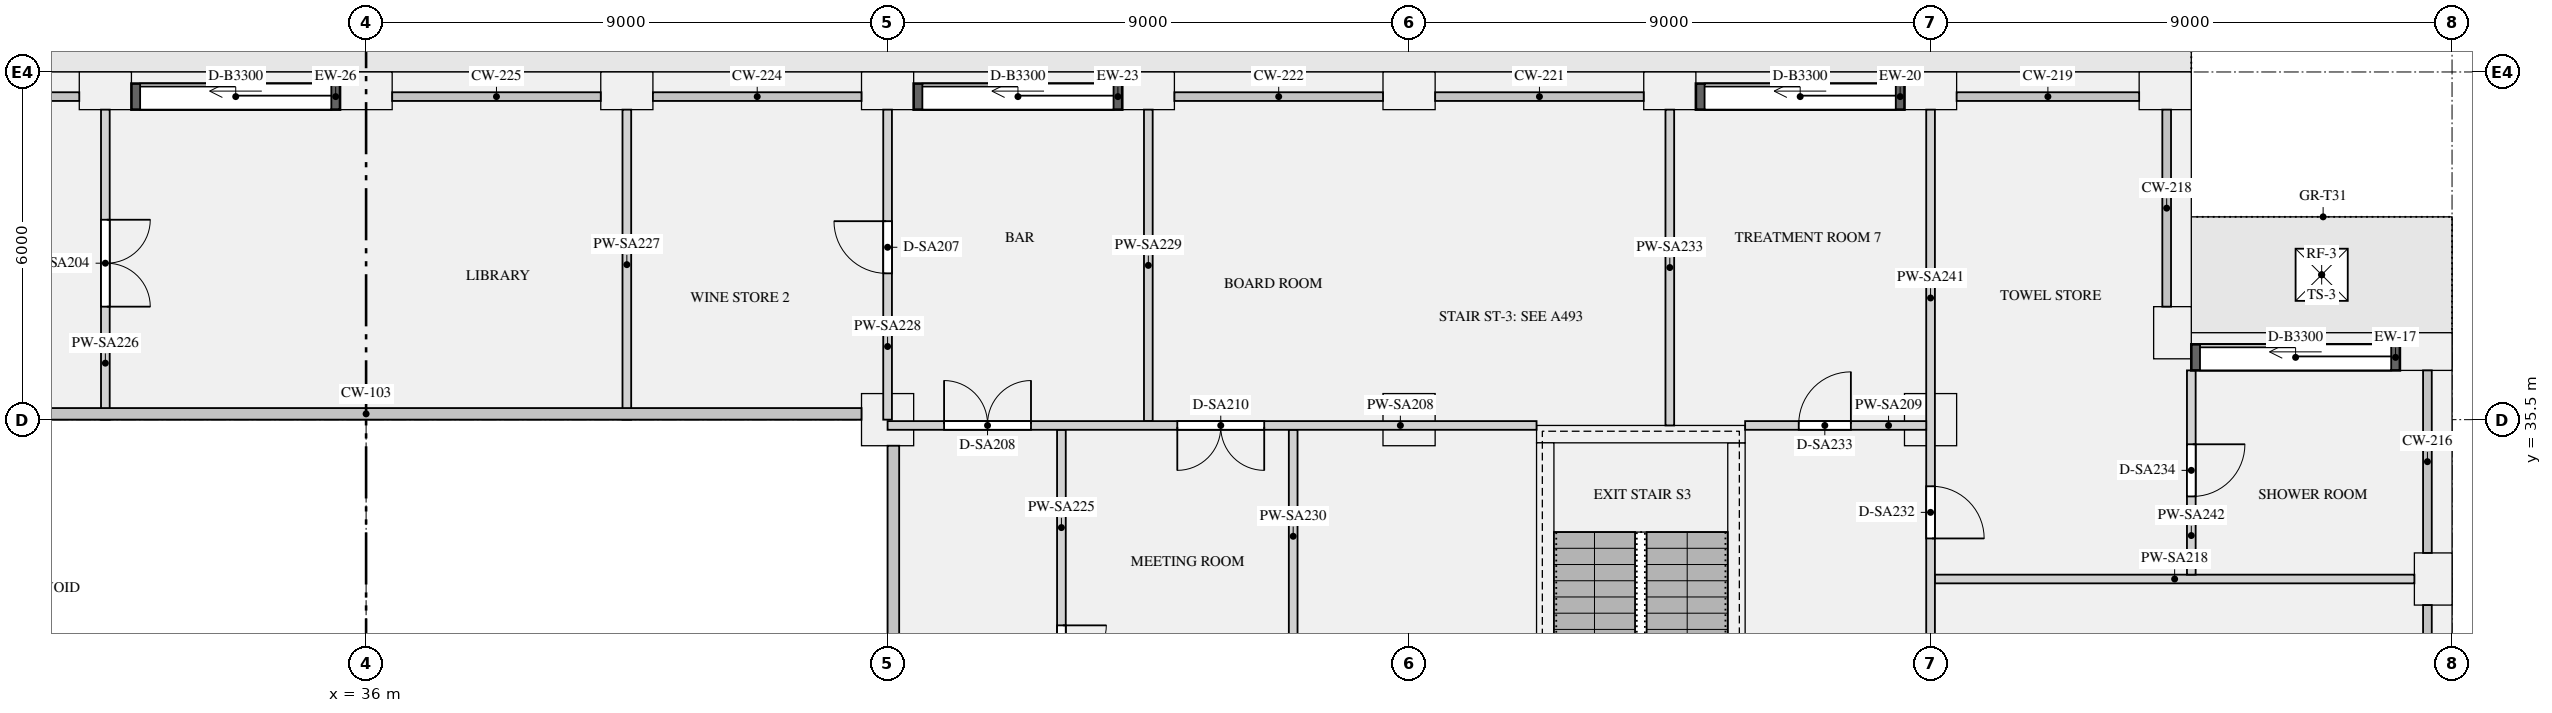
"""IFC4 building model, lengths in metres.
Left out: names, types, materials, properties, quantities, classifications, styles, units other than length and angle.
Written with IfcOpenShell. Run it as: python <this file> out.ifc"""

import sys

from ifc_helpers import new_model, si_unit, direction, frame, frame_2d, origin, origin_2d, place, context, subcontext, project, spatial, rectangle, extrude, element, fill, save


model = new_model("IFC4")
c1 = context("Model", 3, precision=1e-05, world=origin(), true_north=direction((0.0, 1.0)))
c2 = subcontext(c1, "Body", "Model", "MODEL_VIEW")
j1 = project(units=[si_unit("LENGTHUNIT", "METRE"), si_unit("PLANEANGLEUNIT", "RADIAN")], contexts=[c1])
p1 = place(None, origin())
s1 = spatial("IfcSite", under=j1, at=p1, CompositionType="ELEMENT")
p2 = place(p1, origin())
s2 = spatial("IfcBuilding", under=s1, at=p2, CompositionType="ELEMENT")
p3 = place(p2, frame((0.0, 0.0, 191.7)))
s3 = spatial("IfcBuildingStorey", under=s2, at=p3, CompositionType="ELEMENT", Elevation=191.7)
for number, where, z_axis, x_axis in (
    (1, (71.675, 32.75, 0.0), (0.0, 0.0, 1.0), (0.0, 1.0, 0.0)),
    (2, (71.55, 36.675, 0.0), (0.0, 0.0, 1.0), (-1.0, 0.0, 0.0)),
    (3, (67.175, 37.0, 0.0), (0.0, 0.0, 1.0), (0.0, 1.0, 0.0)),
    (4, (67.05, 41.175, 0.0), (0.0, 0.0, 1.0), (-1.0, 0.0, 0.0)),
    (5, (63.0, 41.175, 0.0), (0.0, 0.0, 1.0), (-1.0, 0.0, 0.0)),
    (6, (58.5, 41.175, 0.0), (0.0, 0.0, 1.0), (-1.0, 0.0, 0.0)),
    (7, (54.0, 41.175, 0.0), (0.0, 0.0, 1.0), (-1.0, 0.0, 0.0)),
    (8, (49.5, 41.175, 0.0), (0.0, 0.0, 1.0), (-1.0, 0.0, 0.0)),
    (9, (45.0, 41.175, 0.0), (0.0, 0.0, 1.0), (-1.0, 0.0, 0.0)),
    (10, (40.5, 41.175, 0.0), (0.0, 0.0, 1.0), (-1.0, 0.0, 0.0)),
    (11, (36.0, 41.175, 0.0), (0.0, 0.0, 1.0), (-1.0, 0.0, 0.0)),
    (12, (31.5, 41.175, 0.0), (0.0, 0.0, 1.0), (-1.0, 0.0, 0.0)),
):
    element("IfcColumn", number, at=place(p3, frame(where, z_axis=z_axis, x_axis=x_axis)), inside=s3, PredefinedType="USERDEFINED", context=c2, shape_type="SweptSolid", body=[
        extrude(rectangle(XDim=0.9, YDim=0.65, at=origin_2d()), origin(), (0.0, 0.0, 1.0), 6.3),
    ])
for number, where, z_axis, x_axis in (
    (13, (45.0, 35.5, 0.0), (0.0, 0.0, 1.0), (1.0, 0.0, 0.0)),
    (14, (54.0, 35.5, 0.0), (0.0, 0.0, 1.0), (1.0, 0.0, 0.0)),
    (15, (63.0, 35.5, 0.0), (0.0, 0.0, 1.0), (1.0, 0.0, 0.0)),
):
    element("IfcColumn", number, at=place(p3, frame(where, z_axis=z_axis, x_axis=x_axis)), inside=s3, PredefinedType="COLUMN", context=c2, shape_type="SweptSolid", body=[
        extrude(rectangle(XDim=0.9, YDim=0.9, at=origin_2d()), origin(), (0.0, 0.0, 1.0), 6.3),
    ])
p4 = place(p3, frame((56.2, 35.25, 0.0), z_axis=(0.0, 0.0, 1.0), x_axis=(1.0, 0.0, 0.0)))
e16 = element("IfcWall", 16, at=p4, inside=s3, PredefinedType="SHEAR", context=c2, shape_type="SweptSolid", body=[
    extrude(rectangle(XDim=3.6, YDim=0.3, at=frame_2d((1.8, 0.0))), origin(), (0.0, 0.0, 1.0), 6.3),
])
for number, where, z_axis, x_axis in (
    (17, (56.35, 27.3, 0.0), (0.0, 0.0, 1.0), (0.0, 1.0, 0.0)),
    (18, (59.65, 27.3, 0.0), (0.0, 0.0, 1.0), (0.0, 1.0, 0.0)),
):
    element("IfcWall", number, at=place(p3, frame(where, z_axis=z_axis, x_axis=x_axis)), inside=s3, PredefinedType="SHEAR", context=c2, shape_type="SweptSolid", body=[
        extrude(rectangle(XDim=7.8, YDim=0.3, at=frame_2d((3.9, 0.0))), origin(), (0.0, 0.0, 1.0), 6.3),
    ])
p5 = place(p3, frame((71.1, 36.575, 0.0), z_axis=(0.0, 0.0, 1.0), x_axis=(-1.0, 0.0, 0.0)))
e19 = element("IfcWall", 19, at=p5, inside=s3, PredefinedType="SOLIDWALL", context=c2, shape_type="SweptSolid", body=[
    extrude(rectangle(XDim=3.6, YDim=0.45, at=frame_2d((1.8, 0.0))), origin(), (0.0, 0.0, 1.0), 5.98),
])
p6 = place(p5, frame((0.15, 0.0, 0.0)))
e20 = element("IfcOpeningElement", 20, at=p6, cuts=e19, PredefinedType="OPENING", context=c2, shape_type="SweptSolid", body=[
    extrude(rectangle(XDim=3.3, YDim=2.3, at=frame_2d((1.65, 1.15))), frame((0.0, 0.235, 0.0), z_axis=(0.0, -1.0, 0.0), x_axis=(1.0, 0.0, 0.0)), (0.0, 0.0, 1.0), 0.47),
])
p7 = place(p3, frame((62.55, 41.075, 0.0), z_axis=(0.0, 0.0, 1.0), x_axis=(-1.0, 0.0, 0.0)))
e21 = element("IfcWall", 21, at=p7, inside=s3, PredefinedType="SOLIDWALL", context=c2, shape_type="SweptSolid", body=[
    extrude(rectangle(XDim=3.6, YDim=0.45, at=frame_2d((1.8, 0.0))), origin(), (0.0, 0.0, 1.0), 5.98),
])
p8 = place(p7, frame((0.15, 0.0, 0.0)))
e22 = element("IfcOpeningElement", 22, at=p8, cuts=e21, PredefinedType="OPENING", context=c2, shape_type="SweptSolid", body=[
    extrude(rectangle(XDim=3.3, YDim=2.3, at=frame_2d((1.65, 1.15))), frame((0.0, 0.235, 0.0), z_axis=(0.0, -1.0, 0.0), x_axis=(1.0, 0.0, 0.0)), (0.0, 0.0, 1.0), 0.47),
])
p9 = place(p3, frame((49.05, 41.075, 0.0), z_axis=(0.0, 0.0, 1.0), x_axis=(-1.0, 0.0, 0.0)))
e23 = element("IfcWall", 23, at=p9, inside=s3, PredefinedType="SOLIDWALL", context=c2, shape_type="SweptSolid", body=[
    extrude(rectangle(XDim=3.6, YDim=0.45, at=frame_2d((1.8, 0.0))), origin(), (0.0, 0.0, 1.0), 5.98),
])
p10 = place(p9, frame((0.15, 0.0, 0.0)))
e24 = element("IfcOpeningElement", 24, at=p10, cuts=e23, PredefinedType="OPENING", context=c2, shape_type="SweptSolid", body=[
    extrude(rectangle(XDim=3.3, YDim=2.3, at=frame_2d((1.65, 1.15))), frame((0.0, 0.235, 0.0), z_axis=(0.0, -1.0, 0.0), x_axis=(1.0, 0.0, 0.0)), (0.0, 0.0, 1.0), 0.47),
])
p11 = place(p3, frame((35.55, 41.075, 0.0), z_axis=(0.0, 0.0, 1.0), x_axis=(-1.0, 0.0, 0.0)))
e25 = element("IfcWall", 25, at=p11, inside=s3, PredefinedType="SOLIDWALL", context=c2, shape_type="SweptSolid", body=[
    extrude(rectangle(XDim=3.6, YDim=0.45, at=frame_2d((1.8, 0.0))), origin(), (0.0, 0.0, 1.0), 5.98),
])
p12 = place(p11, frame((0.15, 0.0, 0.0)))
e26 = element("IfcOpeningElement", 26, at=p12, cuts=e25, PredefinedType="OPENING", context=c2, shape_type="SweptSolid", body=[
    extrude(rectangle(XDim=3.3, YDim=2.3, at=frame_2d((1.65, 1.15))), frame((0.0, 0.235, 0.0), z_axis=(0.0, -1.0, 0.0), x_axis=(1.0, 0.0, 0.0)), (0.0, 0.0, 1.0), 0.47),
])
p13 = place(p3, frame((45.0, 35.4, 0.0), z_axis=(0.0, 0.0, 1.0), x_axis=(1.0, 0.0, 0.0)))
e27 = element("IfcWall", 27, at=p13, inside=s3, PredefinedType="PARTITIONING", context=c2, shape_type="SweptSolid", body=[
    extrude(rectangle(XDim=11.2, YDim=0.15, at=frame_2d((5.6, 0.0))), origin(), (0.0, 0.0, 1.0), 5.98),
])
p14 = place(p13, frame((0.975, 0.0, 0.0)))
e28 = element("IfcOpeningElement", 28, at=p14, cuts=e27, PredefinedType="OPENING", context=c2, shape_type="SweptSolid", body=[
    extrude(rectangle(XDim=1.5, YDim=2.1, at=frame_2d((0.75, 1.05))), frame((0.0, 0.085, 0.0), z_axis=(0.0, -1.0, 0.0), x_axis=(1.0, 0.0, 0.0)), (0.0, 0.0, 1.0), 0.17),
])
p15 = place(p13, frame((5.0, 0.0, 0.0)))
e29 = element("IfcOpeningElement", 29, at=p15, cuts=e27, PredefinedType="OPENING", context=c2, shape_type="SweptSolid", body=[
    extrude(rectangle(XDim=1.5, YDim=2.1, at=frame_2d((0.75, 1.05))), frame((0.0, 0.085, 0.0), z_axis=(0.0, -1.0, 0.0), x_axis=(1.0, 0.0, 0.0)), (0.0, 0.0, 1.0), 0.17),
])
p16 = place(p3, frame((59.8, 35.4, 0.0), z_axis=(0.0, 0.0, 1.0), x_axis=(1.0, 0.0, 0.0)))
e30 = element("IfcWall", 30, at=p16, inside=s3, PredefinedType="PARTITIONING", context=c2, shape_type="SweptSolid", body=[
    extrude(rectangle(XDim=3.125, YDim=0.15, at=frame_2d((1.562, 0.0))), origin(), (0.0, 0.0, 1.0), 5.98),
])
p17 = place(p16, frame((0.925, 0.0, 0.0)))
e31 = element("IfcOpeningElement", 31, at=p17, cuts=e30, PredefinedType="OPENING", context=c2, shape_type="SweptSolid", body=[
    extrude(rectangle(XDim=0.9, YDim=2.1, at=frame_2d((0.45, 1.05))), frame((0.0, 0.085, 0.0), z_axis=(0.0, -1.0, 0.0), x_axis=(1.0, 0.0, 0.0)), (0.0, 0.0, 1.0), 0.17),
])
p18 = place(p3, frame((63.075, 32.75, 0.0), z_axis=(0.0, 0.0, 1.0), x_axis=(1.0, 0.0, 0.0)))
e32 = element("IfcWall", 32, at=p18, inside=s3, PredefinedType="PARTITIONING", context=c2, shape_type="SweptSolid", body=[
    extrude(rectangle(XDim=8.275, YDim=0.15, at=frame_2d((4.138, 0.0))), origin(), (0.0, 0.0, 1.0), 5.98),
])
p19 = place(p3, frame((48.0, 27.075, 0.0), z_axis=(0.0, 0.0, 1.0), x_axis=(0.0, 1.0, 0.0)))
e33 = element("IfcWall", 33, at=p19, inside=s3, PredefinedType="PARTITIONING", context=c2, shape_type="SweptSolid", body=[
    extrude(rectangle(XDim=8.25, YDim=0.15, at=frame_2d((4.125, 0.0))), origin(), (0.0, 0.0, 1.0), 5.98),
])
p20 = place(p19, frame((3.375, 0.0, 0.0)))
e34 = element("IfcOpeningElement", 34, at=p20, cuts=e33, PredefinedType="OPENING", context=c2, shape_type="SweptSolid", body=[
    extrude(rectangle(XDim=1.5, YDim=2.1, at=frame_2d((0.75, 1.05))), frame((0.0, 0.085, 0.0), z_axis=(0.0, -1.0, 0.0), x_axis=(1.0, 0.0, 0.0)), (0.0, 0.0, 1.0), 0.17),
])
p21 = place(p3, frame((31.5, 35.5, 0.0), z_axis=(0.0, 0.0, 1.0), x_axis=(0.0, 1.0, 0.0)))
e35 = element("IfcWall", 35, at=p21, inside=s3, PredefinedType="PARTITIONING", context=c2, shape_type="SweptSolid", body=[
    extrude(rectangle(XDim=5.35, YDim=0.15, at=frame_2d((2.675, 0.0))), origin(), (0.0, 0.0, 1.0), 5.98),
])
p22 = place(p21, frame((1.95, 0.0, 0.0)))
e36 = element("IfcOpeningElement", 36, at=p22, cuts=e35, PredefinedType="OPENING", context=c2, shape_type="SweptSolid", body=[
    extrude(rectangle(XDim=1.5, YDim=2.1, at=frame_2d((0.75, 1.05))), frame((0.0, 0.085, 0.0), z_axis=(0.0, -1.0, 0.0), x_axis=(1.0, 0.0, 0.0)), (0.0, 0.0, 1.0), 0.17),
])
p23 = place(p3, frame((40.5, 35.5, 0.0), z_axis=(0.0, 0.0, 1.0), x_axis=(0.0, 1.0, 0.0)))
e37 = element("IfcWall", 37, at=p23, inside=s3, PredefinedType="PARTITIONING", context=c2, shape_type="SweptSolid", body=[
    extrude(rectangle(XDim=5.35, YDim=0.15, at=frame_2d((2.675, 0.0))), origin(), (0.0, 0.0, 1.0), 5.98),
])
p24 = place(p3, frame((45.0, 35.5, 0.0), z_axis=(0.0, 0.0, 1.0), x_axis=(0.0, 1.0, 0.0)))
e38 = element("IfcWall", 38, at=p24, inside=s3, PredefinedType="PARTITIONING", context=c2, shape_type="SweptSolid", body=[
    extrude(rectangle(XDim=5.35, YDim=0.15, at=frame_2d((2.675, 0.0))), origin(), (0.0, 0.0, 1.0), 5.98),
])
p25 = place(p24, frame((2.525, 0.0, 0.0)))
e39 = element("IfcOpeningElement", 39, at=p25, cuts=e38, PredefinedType="OPENING", context=c2, shape_type="SweptSolid", body=[
    extrude(rectangle(XDim=0.9, YDim=2.1, at=frame_2d((0.45, 1.05))), frame((0.0, 0.085, 0.0), z_axis=(0.0, -1.0, 0.0), x_axis=(1.0, 0.0, 0.0)), (0.0, 0.0, 1.0), 0.17),
])
p26 = place(p3, frame((49.5, 35.475, 0.0), z_axis=(0.0, 0.0, 1.0), x_axis=(0.0, 1.0, 0.0)))
e40 = element("IfcWall", 40, at=p26, inside=s3, PredefinedType="PARTITIONING", context=c2, shape_type="SweptSolid", body=[
    extrude(rectangle(XDim=5.375, YDim=0.15, at=frame_2d((2.688, 0.0))), origin(), (0.0, 0.0, 1.0), 5.98),
])
p27 = place(p3, frame((52.0, 27.075, 0.0), z_axis=(0.0, 0.0, 1.0), x_axis=(0.0, 1.0, 0.0)))
e41 = element("IfcWall", 41, at=p27, inside=s3, PredefinedType="PARTITIONING", context=c2, shape_type="SweptSolid", body=[
    extrude(rectangle(XDim=8.25, YDim=0.15, at=frame_2d((4.125, 0.0))), origin(), (0.0, 0.0, 1.0), 5.98),
])
p28 = place(p27, frame((3.675, 0.0, 0.0)))
e42 = element("IfcOpeningElement", 42, at=p28, cuts=e41, PredefinedType="OPENING", context=c2, shape_type="SweptSolid", body=[
    extrude(rectangle(XDim=0.9, YDim=2.1, at=frame_2d((0.45, 1.05))), frame((0.0, 0.085, 0.0), z_axis=(0.0, -1.0, 0.0), x_axis=(1.0, 0.0, 0.0)), (0.0, 0.0, 1.0), 0.17),
])
p29 = place(p3, frame((58.5, 35.4, 0.0), z_axis=(0.0, 0.0, 1.0), x_axis=(0.0, 1.0, 0.0)))
e43 = element("IfcWall", 43, at=p29, inside=s3, PredefinedType="PARTITIONING", context=c2, shape_type="SweptSolid", body=[
    extrude(rectangle(XDim=5.45, YDim=0.15, at=frame_2d((2.725, 0.0))), origin(), (0.0, 0.0, 1.0), 5.98),
])
p30 = place(p3, frame((63.0, 16.575, 0.0), z_axis=(0.0, 0.0, 1.0), x_axis=(0.0, 1.0, 0.0)))
e44 = element("IfcWall", 44, at=p30, inside=s3, PredefinedType="PARTITIONING", context=c2, shape_type="SweptSolid", body=[
    extrude(rectangle(XDim=24.275, YDim=0.15, at=frame_2d((12.138, 0.0))), origin(), (0.0, 0.0, 1.0), 5.98),
])
p31 = place(p30, frame((2.7, 0.0, 0.0)))
e45 = element("IfcOpeningElement", 45, at=p31, cuts=e44, PredefinedType="OPENING", context=c2, shape_type="SweptSolid", body=[
    extrude(rectangle(XDim=1.5, YDim=2.1, at=frame_2d((0.75, 1.05))), frame((0.0, 0.085, 0.0), z_axis=(0.0, -1.0, 0.0), x_axis=(1.0, 0.0, 0.0)), (0.0, 0.0, 1.0), 0.17),
])
p32 = place(p30, frame((9.475, 0.0, 0.0)))
e46 = element("IfcOpeningElement", 46, at=p32, cuts=e44, PredefinedType="OPENING", context=c2, shape_type="SweptSolid", body=[
    extrude(rectangle(XDim=0.9, YDim=2.1, at=frame_2d((0.45, 1.05))), frame((0.0, 0.085, 0.0), z_axis=(0.0, -1.0, 0.0), x_axis=(1.0, 0.0, 0.0)), (0.0, 0.0, 1.0), 0.17),
])
p33 = place(p30, frame((13.6, 0.0, 0.0)))
e47 = element("IfcOpeningElement", 47, at=p33, cuts=e44, PredefinedType="OPENING", context=c2, shape_type="SweptSolid", body=[
    extrude(rectangle(XDim=0.9, YDim=2.1, at=frame_2d((0.45, 1.05))), frame((0.0, 0.085, 0.0), z_axis=(0.0, -1.0, 0.0), x_axis=(1.0, 0.0, 0.0)), (0.0, 0.0, 1.0), 0.17),
])
p34 = place(p30, frame((16.875, 0.0, 0.0)))
e48 = element("IfcOpeningElement", 48, at=p34, cuts=e44, PredefinedType="OPENING", context=c2, shape_type="SweptSolid", body=[
    extrude(rectangle(XDim=0.9, YDim=2.1, at=frame_2d((0.45, 1.05))), frame((0.0, 0.085, 0.0), z_axis=(0.0, -1.0, 0.0), x_axis=(1.0, 0.0, 0.0)), (0.0, 0.0, 1.0), 0.17),
])
p35 = place(p3, frame((67.5, 32.825, 0.0), z_axis=(0.0, 0.0, 1.0), x_axis=(0.0, 1.0, 0.0)))
e49 = element("IfcWall", 49, at=p35, inside=s3, PredefinedType="PARTITIONING", context=c2, shape_type="SweptSolid", body=[
    extrude(rectangle(XDim=3.525, YDim=0.15, at=frame_2d((1.763, 0.0))), origin(), (0.0, 0.0, 1.0), 5.98),
])
p36 = place(p35, frame((1.35, 0.0, 0.0)))
e50 = element("IfcOpeningElement", 50, at=p36, cuts=e49, PredefinedType="OPENING", context=c2, shape_type="SweptSolid", body=[
    extrude(rectangle(XDim=0.9, YDim=2.1, at=frame_2d((0.45, 1.05))), frame((0.0, 0.085, 0.0), z_axis=(0.0, -1.0, 0.0), x_axis=(1.0, 0.0, 0.0)), (0.0, 0.0, 1.0), 0.17),
])
p37 = place(p6, origin())
e51 = element("IfcDoor", 51, at=p37, inside=s3, OperationType="SLIDING_TO_LEFT", PredefinedType="DOOR", context=c2, shape_type="SweptSolid", body=[
    extrude(rectangle(XDim=3.3, YDim=2.3, at=frame_2d((1.65, 1.15))), frame((0.0, -0.07, 0.0), z_axis=(0.0, -1.0, 0.0), x_axis=(1.0, 0.0, 0.0)), (0.0, 0.0, 1.0), 0.05),
])
fill(e20, e51)
p38 = place(p8, origin())
e52 = element("IfcDoor", 52, at=p38, inside=s3, OperationType="SLIDING_TO_LEFT", PredefinedType="DOOR", context=c2, shape_type="SweptSolid", body=[
    extrude(rectangle(XDim=3.3, YDim=2.3, at=frame_2d((1.65, 1.15))), frame((0.0, -0.07, 0.0), z_axis=(0.0, -1.0, 0.0), x_axis=(1.0, 0.0, 0.0)), (0.0, 0.0, 1.0), 0.05),
])
fill(e22, e52)
p39 = place(p10, origin())
e53 = element("IfcDoor", 53, at=p39, inside=s3, OperationType="SLIDING_TO_LEFT", PredefinedType="DOOR", context=c2, shape_type="SweptSolid", body=[
    extrude(rectangle(XDim=3.3, YDim=2.3, at=frame_2d((1.65, 1.15))), frame((0.0, -0.07, 0.0), z_axis=(0.0, -1.0, 0.0), x_axis=(1.0, 0.0, 0.0)), (0.0, 0.0, 1.0), 0.05),
])
fill(e24, e53)
p40 = place(p12, origin())
e54 = element("IfcDoor", 54, at=p40, inside=s3, OperationType="SLIDING_TO_LEFT", PredefinedType="DOOR", context=c2, shape_type="SweptSolid", body=[
    extrude(rectangle(XDim=3.3, YDim=2.3, at=frame_2d((1.65, 1.15))), frame((0.0, -0.07, 0.0), z_axis=(0.0, -1.0, 0.0), x_axis=(1.0, 0.0, 0.0)), (0.0, 0.0, 1.0), 0.05),
])
fill(e26, e54)
p41 = place(p3, frame((0.0, 0.0, -0.34)))
p42 = place(p41, frame((69.75, 38.0, 0.0)))
p43 = place(p42, frame((0.0, 0.0, 0.25)))
e55 = element("IfcWindow", 55, at=p43, inside=s3, PartitioningType="SINGLE_PANEL", PredefinedType="SKYLIGHT", context=c2, shape_type="SweptSolid", body=[
    extrude(rectangle(XDim=0.9, YDim=0.9, at=origin_2d()), origin(), (0.0, 0.0, 1.0), 0.05),
])
p44 = place(p22, frame((1.5, 0.0, 0.0), z_axis=(0.0, 0.0, 1.0), x_axis=(-1.0, 0.0, 0.0)))
e56 = element("IfcDoor", 56, at=p44, inside=s3, OperationType="DOUBLE_DOOR_SINGLE_SWING", PredefinedType="DOOR", context=c2, shape_type="SweptSolid", body=[
    extrude(rectangle(XDim=1.5, YDim=2.1, at=frame_2d((0.75, 1.05))), frame((0.0, 0.025, 0.0), z_axis=(0.0, -1.0, 0.0), x_axis=(1.0, 0.0, 0.0)), (0.0, 0.0, 1.0), 0.05),
])
fill(e36, e56)
p45 = place(p25, origin())
e57 = element("IfcDoor", 57, at=p45, inside=s3, OperationType="SINGLE_SWING_RIGHT", PredefinedType="DOOR", context=c2, shape_type="SweptSolid", body=[
    extrude(rectangle(XDim=0.9, YDim=2.1, at=frame_2d((0.45, 1.05))), frame((0.0, 0.025, 0.0), z_axis=(0.0, -1.0, 0.0), x_axis=(1.0, 0.0, 0.0)), (0.0, 0.0, 1.0), 0.05),
])
fill(e39, e57)
p46 = place(p14, origin())
e58 = element("IfcDoor", 58, at=p46, inside=s3, OperationType="DOUBLE_DOOR_SINGLE_SWING", PredefinedType="DOOR", context=c2, shape_type="SweptSolid", body=[
    extrude(rectangle(XDim=1.5, YDim=2.1, at=frame_2d((0.75, 1.05))), frame((0.0, 0.025, 0.0), z_axis=(0.0, -1.0, 0.0), x_axis=(1.0, 0.0, 0.0)), (0.0, 0.0, 1.0), 0.05),
])
fill(e28, e58)
p47 = place(p20, frame((1.5, 0.0, 0.0), z_axis=(0.0, 0.0, 1.0), x_axis=(-1.0, 0.0, 0.0)))
e59 = element("IfcDoor", 59, at=p47, inside=s3, OperationType="DOUBLE_DOOR_SINGLE_SWING", PredefinedType="DOOR", context=c2, shape_type="SweptSolid", body=[
    extrude(rectangle(XDim=1.5, YDim=2.1, at=frame_2d((0.75, 1.05))), frame((0.0, 0.025, 0.0), z_axis=(0.0, -1.0, 0.0), x_axis=(1.0, 0.0, 0.0)), (0.0, 0.0, 1.0), 0.05),
])
fill(e34, e59)
p48 = place(p15, frame((1.5, 0.0, 0.0), z_axis=(0.0, 0.0, 1.0), x_axis=(-1.0, 0.0, 0.0)))
e60 = element("IfcDoor", 60, at=p48, inside=s3, OperationType="DOUBLE_DOOR_SINGLE_SWING", PredefinedType="DOOR", context=c2, shape_type="SweptSolid", body=[
    extrude(rectangle(XDim=1.5, YDim=2.1, at=frame_2d((0.75, 1.05))), frame((0.0, 0.025, 0.0), z_axis=(0.0, -1.0, 0.0), x_axis=(1.0, 0.0, 0.0)), (0.0, 0.0, 1.0), 0.05),
])
fill(e29, e60)
p49 = place(p34, frame((0.9, 0.0, 0.0), z_axis=(0.0, 0.0, 1.0), x_axis=(-1.0, 0.0, 0.0)))
e61 = element("IfcDoor", 61, at=p49, inside=s3, OperationType="SINGLE_SWING_RIGHT", PredefinedType="DOOR", context=c2, shape_type="SweptSolid", body=[
    extrude(rectangle(XDim=0.9, YDim=2.1, at=frame_2d((0.45, 1.05))), frame((0.0, 0.025, 0.0), z_axis=(0.0, -1.0, 0.0), x_axis=(1.0, 0.0, 0.0)), (0.0, 0.0, 1.0), 0.05),
])
fill(e48, e61)
p50 = place(p17, origin())
e62 = element("IfcDoor", 62, at=p50, inside=s3, OperationType="SINGLE_SWING_RIGHT", PredefinedType="DOOR", context=c2, shape_type="SweptSolid", body=[
    extrude(rectangle(XDim=0.9, YDim=2.1, at=frame_2d((0.45, 1.05))), frame((0.0, 0.025, 0.0), z_axis=(0.0, -1.0, 0.0), x_axis=(1.0, 0.0, 0.0)), (0.0, 0.0, 1.0), 0.05),
])
fill(e31, e62)
p51 = place(p36, frame((0.9, 0.0, 0.0), z_axis=(0.0, 0.0, 1.0), x_axis=(-1.0, 0.0, 0.0)))
e63 = element("IfcDoor", 63, at=p51, inside=s3, OperationType="SINGLE_SWING_LEFT", PredefinedType="DOOR", context=c2, shape_type="SweptSolid", body=[
    extrude(rectangle(XDim=0.9, YDim=2.1, at=frame_2d((0.45, 1.05))), frame((0.0, 0.025, 0.0), z_axis=(0.0, -1.0, 0.0), x_axis=(1.0, 0.0, 0.0)), (0.0, 0.0, 1.0), 0.05),
])
fill(e50, e63)
save(model, sys.argv[1])
